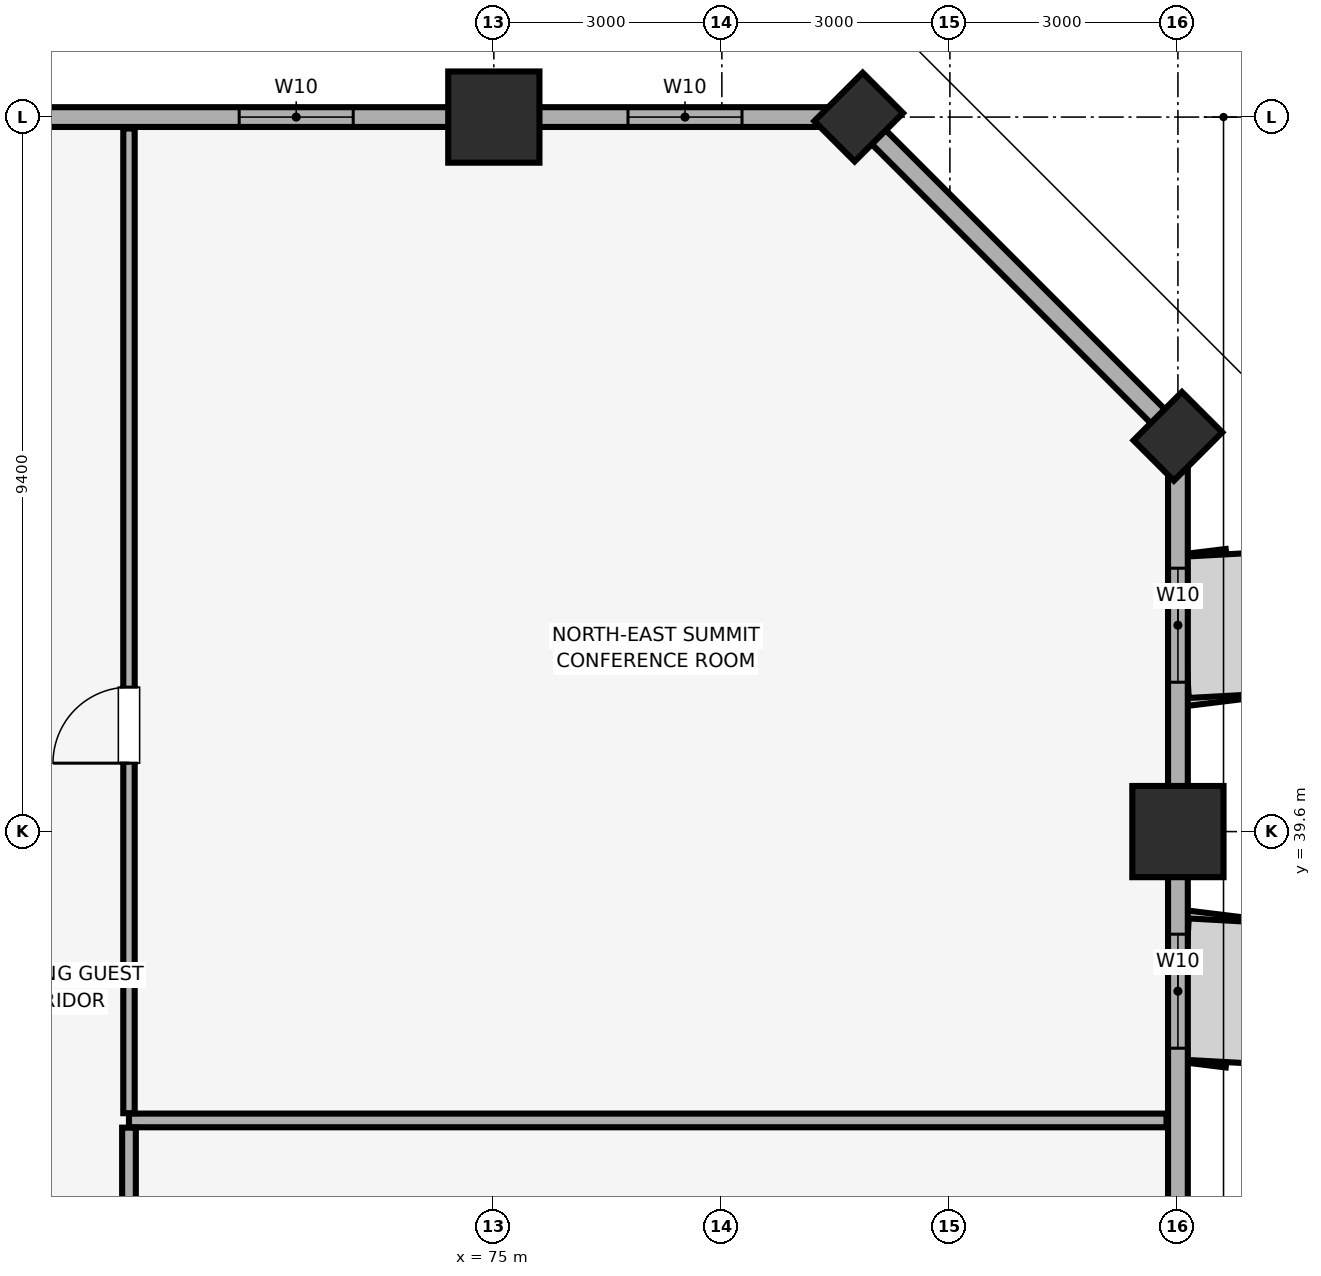
"""IFC4 building model, lengths in metres.
Left out: names, types, materials, properties, quantities, classifications, styles, units other than length and angle.
Written with IfcOpenShell. Run it as: python <this file> out.ifc"""

import sys

from ifc_helpers import new_model, si_unit, direction, frame, frame_2d, origin, origin_2d, place, context, subcontext, project, spatial, rectangle, extrude, element, fill, save


model = new_model("IFC4")
c1 = context("Model", 3, precision=1e-05, world=origin(), true_north=direction((0.0, 1.0)))
c2 = subcontext(c1, "Body", "Model", "MODEL_VIEW")
j1 = project(units=[si_unit("LENGTHUNIT", "METRE"), si_unit("PLANEANGLEUNIT", "RADIAN")], contexts=[c1])
p1 = place(None, origin())
s1 = spatial("IfcSite", under=j1, at=p1, CompositionType="ELEMENT")
p2 = place(p1, origin())
s2 = spatial("IfcBuilding", under=s1, at=p2, CompositionType="ELEMENT")
p3 = place(p2, frame((0.0, 0.0, 104.3)))
s3 = spatial("IfcBuildingStorey", under=s2, at=p3, CompositionType="ELEMENT", Elevation=104.3)
p4 = place(p3, frame((84.0, 39.6, 0.0), z_axis=(0.0, 0.0, 1.0), x_axis=(1.0, 0.0, 0.0)))
e1 = element("IfcColumn", 1, at=p4, inside=s3, PredefinedType="COLUMN", context=c2, shape_type="SweptSolid", body=[
    extrude(rectangle(XDim=1.2, YDim=1.2, at=origin_2d()), origin(), (0.0, 0.0, 1.0), 3.51),
])
for number, where, z_axis, x_axis in (
    (2, (84.0, 44.8, 0.0), (0.0, 0.0, 1.0), (0.707, 0.707, 0.0)),
    (3, (79.8, 49.0, 0.0), (0.0, 0.0, 1.0), (0.707, 0.707, 0.0)),
):
    element("IfcColumn", number, at=place(p3, frame(where, z_axis=z_axis, x_axis=x_axis)), inside=s3, PredefinedType="PILASTER", context=c2, shape_type="SweptSolid", body=[
        extrude(rectangle(XDim=0.9, YDim=0.75, at=origin_2d()), origin(), (0.0, 0.0, 1.0), 3.51),
    ])
p5 = place(p3, frame((75.0, 49.0, 0.0), z_axis=(0.0, 0.0, 1.0), x_axis=(1.0, 0.0, 0.0)))
e4 = element("IfcColumn", 4, at=p5, inside=s3, PredefinedType="COLUMN", context=c2, shape_type="SweptSolid", body=[
    extrude(rectangle(XDim=1.2, YDim=1.2, at=origin_2d()), origin(), (0.0, 0.0, 1.0), 3.51),
])
p6 = place(p3, frame((84.0, 4.2, 0.0), z_axis=(0.0, 0.0, 1.0), x_axis=(0.0, 1.0, 0.0)))
e5 = element("IfcWall", 5, at=p6, inside=s3, PredefinedType="SOLIDWALL", context=c2, shape_type="SweptSolid", body=[
    extrude(rectangle(XDim=40.6, YDim=0.26, at=frame_2d((20.3, 0.0))), origin(), (0.0, 0.0, 1.0), 2.56),
])
p7 = place(p6, frame((6.05, 0.0, 0.85)))
e6 = element("IfcOpeningElement", 6, at=p7, cuts=e5, PredefinedType="OPENING", context=c2, shape_type="SweptSolid", body=[
    extrude(rectangle(XDim=1.5, YDim=1.4, at=frame_2d((0.75, 0.7))), frame((0.0, 0.14, 0.0), z_axis=(0.0, -1.0, 0.0), x_axis=(1.0, 0.0, 0.0)), (0.0, 0.0, 1.0), 0.28),
])
p8 = place(p6, frame((13.75, 0.0, 0.85)))
e7 = element("IfcOpeningElement", 7, at=p8, cuts=e5, PredefinedType="OPENING", context=c2, shape_type="SweptSolid", body=[
    extrude(rectangle(XDim=1.5, YDim=1.4, at=frame_2d((0.75, 0.7))), frame((0.0, 0.14, 0.0), z_axis=(0.0, -1.0, 0.0), x_axis=(1.0, 0.0, 0.0)), (0.0, 0.0, 1.0), 0.28),
])
p9 = place(p6, frame((21.475, 0.0, 0.85)))
e8 = element("IfcOpeningElement", 8, at=p9, cuts=e5, PredefinedType="OPENING", context=c2, shape_type="SweptSolid", body=[
    extrude(rectangle(XDim=1.5, YDim=1.4, at=frame_2d((0.75, 0.7))), frame((0.0, 0.14, 0.0), z_axis=(0.0, -1.0, 0.0), x_axis=(1.0, 0.0, 0.0)), (0.0, 0.0, 1.0), 0.28),
])
p10 = place(p6, frame((27.85, 0.0, 0.85)))
e9 = element("IfcOpeningElement", 9, at=p10, cuts=e5, PredefinedType="OPENING", context=c2, shape_type="SweptSolid", body=[
    extrude(rectangle(XDim=1.5, YDim=1.4, at=frame_2d((0.75, 0.7))), frame((0.0, 0.14, 0.0), z_axis=(0.0, -1.0, 0.0), x_axis=(1.0, 0.0, 0.0)), (0.0, 0.0, 1.0), 0.28),
])
p11 = place(p6, frame((32.55, 0.0, 0.85)))
e10 = element("IfcOpeningElement", 10, at=p11, cuts=e5, PredefinedType="OPENING", context=c2, shape_type="SweptSolid", body=[
    extrude(rectangle(XDim=1.5, YDim=1.4, at=frame_2d((0.75, 0.7))), frame((0.0, 0.14, 0.0), z_axis=(0.0, -1.0, 0.0), x_axis=(1.0, 0.0, 0.0)), (0.0, 0.0, 1.0), 0.28),
])
p12 = place(p6, frame((37.365, 0.0, 0.85)))
e11 = element("IfcOpeningElement", 11, at=p12, cuts=e5, PredefinedType="OPENING", context=c2, shape_type="SweptSolid", body=[
    extrude(rectangle(XDim=1.5, YDim=1.4, at=frame_2d((0.75, 0.7))), frame((0.0, 0.14, 0.0), z_axis=(0.0, -1.0, 0.0), x_axis=(1.0, 0.0, 0.0)), (0.0, 0.0, 1.0), 0.28),
])
p13 = place(p3, frame((84.0, 44.8, 0.0), z_axis=(0.0, 0.0, 1.0), x_axis=(-0.707106781187, 0.707106781187, 0.0)))
e12 = element("IfcWall", 12, at=p13, inside=s3, PredefinedType="SOLIDWALL", context=c2, shape_type="SweptSolid", body=[
    extrude(rectangle(XDim=5.94, YDim=0.26, at=frame_2d((2.97, 0.0))), origin(), (0.0, 0.0, 1.0), 2.56),
])
p14 = place(p3, frame((79.8, 49.0, 0.0), z_axis=(0.0, 0.0, 1.0), x_axis=(-1.0, 0.0, 0.0)))
e13 = element("IfcWall", 13, at=p14, inside=s3, PredefinedType="SOLIDWALL", context=c2, shape_type="SweptSolid", body=[
    extrude(rectangle(XDim=75.6, YDim=0.26, at=frame_2d((37.8, 0.0))), origin(), (0.0, 0.0, 1.0), 2.56),
])
p15 = place(p14, frame((72.565, 0.0, 0.85)))
e14 = element("IfcOpeningElement", 14, at=p15, cuts=e13, PredefinedType="OPENING", context=c2, shape_type="SweptSolid", body=[
    extrude(rectangle(XDim=1.5, YDim=1.4, at=frame_2d((0.75, 0.7))), frame((0.0, 0.14, 0.0), z_axis=(0.0, -1.0, 0.0), x_axis=(1.0, 0.0, 0.0)), (0.0, 0.0, 1.0), 0.28),
])
p16 = place(p14, frame((67.45, 0.0, 0.85)))
e15 = element("IfcOpeningElement", 15, at=p16, cuts=e13, PredefinedType="OPENING", context=c2, shape_type="SweptSolid", body=[
    extrude(rectangle(XDim=1.5, YDim=1.4, at=frame_2d((0.75, 0.7))), frame((0.0, 0.14, 0.0), z_axis=(0.0, -1.0, 0.0), x_axis=(1.0, 0.0, 0.0)), (0.0, 0.0, 1.0), 0.28),
])
p17 = place(p14, frame((6.65, 0.0, 0.85)))
e16 = element("IfcOpeningElement", 16, at=p17, cuts=e13, PredefinedType="OPENING", context=c2, shape_type="SweptSolid", body=[
    extrude(rectangle(XDim=1.5, YDim=1.4, at=frame_2d((0.75, 0.7))), frame((0.0, 0.14, 0.0), z_axis=(0.0, -1.0, 0.0), x_axis=(1.0, 0.0, 0.0)), (0.0, 0.0, 1.0), 0.28),
])
p18 = place(p14, frame((1.535, 0.0, 0.85)))
e17 = element("IfcOpeningElement", 17, at=p18, cuts=e13, PredefinedType="OPENING", context=c2, shape_type="SweptSolid", body=[
    extrude(rectangle(XDim=1.5, YDim=1.4, at=frame_2d((0.75, 0.7))), frame((0.0, 0.14, 0.0), z_axis=(0.0, -1.0, 0.0), x_axis=(1.0, 0.0, 0.0)), (0.0, 0.0, 1.0), 0.28),
])
p19 = place(p14, frame((51.365, 0.0, 0.9)))
e18 = element("IfcOpeningElement", 18, at=p19, cuts=e13, PredefinedType="OPENING", context=c2, shape_type="SweptSolid", body=[
    extrude(rectangle(XDim=1.5, YDim=1.4, at=frame_2d((0.75, 0.7))), frame((0.0, 0.14, 0.0), z_axis=(0.0, -1.0, 0.0), x_axis=(1.0, 0.0, 0.0)), (0.0, 0.0, 1.0), 0.28),
])
p20 = place(p14, frame((46.0, 0.0, 0.9)))
e19 = element("IfcOpeningElement", 19, at=p20, cuts=e13, PredefinedType="OPENING", context=c2, shape_type="SweptSolid", body=[
    extrude(rectangle(XDim=1.5, YDim=1.4, at=frame_2d((0.75, 0.7))), frame((0.0, 0.14, 0.0), z_axis=(0.0, -1.0, 0.0), x_axis=(1.0, 0.0, 0.0)), (0.0, 0.0, 1.0), 0.28),
])
p21 = place(p14, frame((29.15, 0.0, 0.9)))
e20 = element("IfcOpeningElement", 20, at=p21, cuts=e13, PredefinedType="OPENING", context=c2, shape_type="SweptSolid", body=[
    extrude(rectangle(XDim=1.5, YDim=1.4, at=frame_2d((0.75, 0.7))), frame((0.0, 0.14, 0.0), z_axis=(0.0, -1.0, 0.0), x_axis=(1.0, 0.0, 0.0)), (0.0, 0.0, 1.0), 0.28),
])
p22 = place(p14, frame((23.485, 0.0, 0.9)))
e21 = element("IfcOpeningElement", 21, at=p22, cuts=e13, PredefinedType="OPENING", context=c2, shape_type="SweptSolid", body=[
    extrude(rectangle(XDim=1.5, YDim=1.4, at=frame_2d((0.75, 0.7))), frame((0.0, 0.14, 0.0), z_axis=(0.0, -1.0, 0.0), x_axis=(1.0, 0.0, 0.0)), (0.0, 0.0, 1.0), 0.28),
])
p23 = place(p3, frame((70.2, 35.8, 0.0), z_axis=(0.0, 0.0, 1.0), x_axis=(1.0, 0.0, 0.0)))
e22 = element("IfcWall", 22, at=p23, inside=s3, PredefinedType="PARTITIONING", context=c2, shape_type="SweptSolid", body=[
    extrude(rectangle(XDim=13.65, YDim=0.18, at=frame_2d((6.825, 0.0))), origin(), (0.0, 0.0, 1.0), 3.51),
])
p24 = place(p3, frame((70.2, 29.495, 0.0), z_axis=(0.0, 0.0, 1.0), x_axis=(0.0, 1.0, 0.0)))
e23 = element("IfcWall", 23, at=p24, inside=s3, PredefinedType="PARTITIONING", context=c2, shape_type="SweptSolid", body=[
    extrude(rectangle(XDim=6.21, YDim=0.18, at=frame_2d((3.105, 0.0))), origin(), (0.0, 0.0, 1.0), 3.51),
])
p25 = place(p24, frame((4.08, 0.0, 0.0)))
e24 = element("IfcOpeningElement", 24, at=p25, cuts=e23, PredefinedType="OPENING", context=c2, shape_type="SweptSolid", body=[
    extrude(rectangle(XDim=1.0, YDim=2.15, at=frame_2d((0.5, 1.075))), frame((0.0, 0.1, 0.0), z_axis=(0.0, -1.0, 0.0), x_axis=(1.0, 0.0, 0.0)), (0.0, 0.0, 1.0), 0.2),
])
p26 = place(p3, frame((70.2, 35.895, 0.0), z_axis=(0.0, 0.0, 1.0), x_axis=(0.0, 1.0, 0.0)))
e25 = element("IfcWall", 25, at=p26, inside=s3, PredefinedType="PARTITIONING", context=c2, shape_type="SweptSolid", body=[
    extrude(rectangle(XDim=12.955, YDim=0.15, at=frame_2d((6.478, 0.0))), origin(), (0.0, 0.0, 1.0), 3.51),
])
p27 = place(p26, frame((4.605, 0.0, 0.0)))
e26 = element("IfcOpeningElement", 26, at=p27, cuts=e25, PredefinedType="OPENING", context=c2, shape_type="SweptSolid", body=[
    extrude(rectangle(XDim=1.0, YDim=2.15, at=frame_2d((0.5, 1.075))), frame((0.0, 0.085, 0.0), z_axis=(0.0, -1.0, 0.0), x_axis=(1.0, 0.0, 0.0)), (0.0, 0.0, 1.0), 0.17),
])
p28 = place(p11, origin())
e27 = element("IfcWindow", 27, at=p28, inside=s3, PartitioningType="SINGLE_PANEL", PredefinedType="WINDOW", context=c2, shape_type="SweptSolid", body=[
    extrude(rectangle(XDim=1.5, YDim=1.4, at=frame_2d((0.75, 0.7))), frame((0.0, 0.03, 0.0), z_axis=(0.0, -1.0, 0.0), x_axis=(1.0, 0.0, 0.0)), (0.0, 0.0, 1.0), 0.06),
])
fill(e10, e27)
p29 = place(p12, origin())
e28 = element("IfcWindow", 28, at=p29, inside=s3, PartitioningType="SINGLE_PANEL", PredefinedType="WINDOW", context=c2, shape_type="SweptSolid", body=[
    extrude(rectangle(XDim=1.5, YDim=1.4, at=frame_2d((0.75, 0.7))), frame((0.0, 0.03, 0.0), z_axis=(0.0, -1.0, 0.0), x_axis=(1.0, 0.0, 0.0)), (0.0, 0.0, 1.0), 0.06),
])
fill(e11, e28)
p30 = place(p17, origin())
e29 = element("IfcWindow", 29, at=p30, inside=s3, PartitioningType="SINGLE_PANEL", PredefinedType="WINDOW", context=c2, shape_type="SweptSolid", body=[
    extrude(rectangle(XDim=1.5, YDim=1.4, at=frame_2d((0.75, 0.7))), frame((0.0, 0.03, 0.0), z_axis=(0.0, -1.0, 0.0), x_axis=(1.0, 0.0, 0.0)), (0.0, 0.0, 1.0), 0.06),
])
fill(e16, e29)
p31 = place(p18, origin())
e30 = element("IfcWindow", 30, at=p31, inside=s3, PartitioningType="SINGLE_PANEL", PredefinedType="WINDOW", context=c2, shape_type="SweptSolid", body=[
    extrude(rectangle(XDim=1.5, YDim=1.4, at=frame_2d((0.75, 0.7))), frame((0.0, 0.03, 0.0), z_axis=(0.0, -1.0, 0.0), x_axis=(1.0, 0.0, 0.0)), (0.0, 0.0, 1.0), 0.06),
])
fill(e17, e30)
p32 = place(p27, origin())
e31 = element("IfcDoor", 31, at=p32, inside=s3, OperationType="SINGLE_SWING_LEFT", PredefinedType="DOOR", context=c2, shape_type="SweptSolid", body=[
    extrude(rectangle(XDim=1.0, YDim=2.15, at=frame_2d((0.5, 1.075))), frame((0.0, 0.025, 0.0), z_axis=(0.0, -1.0, 0.0), x_axis=(1.0, 0.0, 0.0)), (0.0, 0.0, 1.0), 0.05),
])
fill(e26, e31)
save(model, sys.argv[1])
